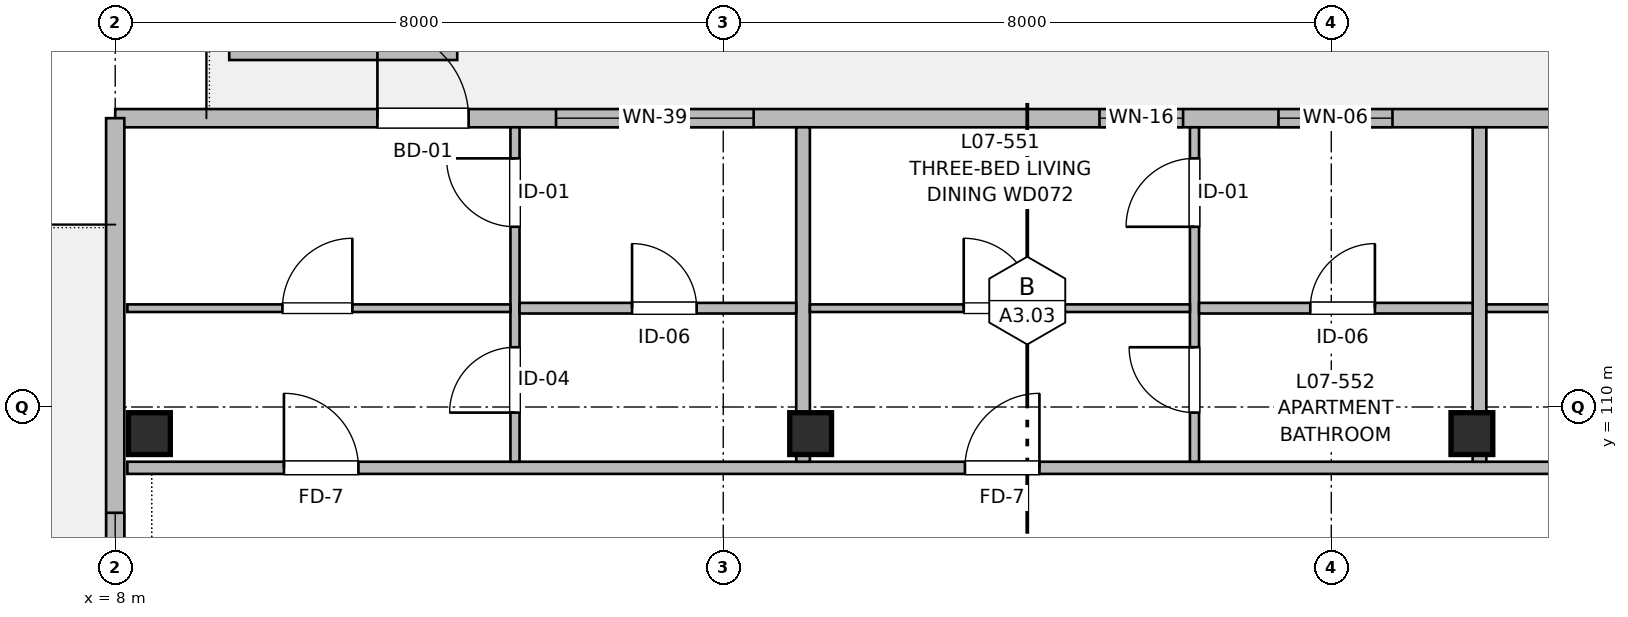
"""IFC4 building model, lengths in metres.
Left out: names, types, materials, properties, quantities, classifications, styles, units other than length and angle.
Written with IfcOpenShell. Run it as: python <this file> out.ifc"""

import sys

from ifc_helpers import new_model, si_unit, direction, frame, frame_2d, origin, origin_2d, place, context, subcontext, project, spatial, rectangle, extrude, element, fill, save


model = new_model("IFC4")
c1 = context("Model", 3, precision=1e-05, world=origin(), true_north=direction((0.0, 1.0)))
c2 = subcontext(c1, "Body", "Model", "MODEL_VIEW")
j1 = project(units=[si_unit("LENGTHUNIT", "METRE"), si_unit("PLANEANGLEUNIT", "RADIAN")], contexts=[c1])
p1 = place(None, origin())
s1 = spatial("IfcSite", under=j1, at=p1, CompositionType="ELEMENT")
p2 = place(p1, origin())
s2 = spatial("IfcBuilding", under=s1, at=p2, CompositionType="ELEMENT")
p3 = place(p2, frame((0.0, 0.0, 23.36)))
s3 = spatial("IfcBuildingStorey", under=s2, at=p3, CompositionType="ELEMENT", Elevation=23.36)
for number, where, z_axis, x_axis in (
    (1, (8.45, 109.65, 0.0), (0.0, 0.0, 1.0), (1.0, 0.0, 0.0)),
    (2, (17.15, 109.65, 0.0), (0.0, 0.0, 1.0), (1.0, 0.0, 0.0)),
    (3, (25.85, 109.65, 0.0), (0.0, 0.0, 1.0), (1.0, 0.0, 0.0)),
):
    element("IfcColumn", number, at=place(p3, frame(where, z_axis=z_axis, x_axis=x_axis)), inside=s3, PredefinedType="COLUMN", context=c2, shape_type="SweptSolid", body=[
        extrude(rectangle(XDim=0.55, YDim=0.55, at=origin_2d()), origin(), (0.0, 0.0, 1.0), 3.2),
    ])
p4 = place(p3, frame((8.0, 113.8, 0.0), z_axis=(0.0, 0.0, 1.0), x_axis=(1.0, 0.0, 0.0)))
e4 = element("IfcWall", 4, at=p4, inside=s3, PredefinedType="SOLIDWALL", context=c2, shape_type="SweptSolid", body=[
    extrude(rectangle(XDim=27.0, YDim=0.24, at=frame_2d((13.5, 0.0))), origin(), (0.0, 0.0, 1.0), 2.98),
])
p5 = place(p4, frame((3.45, 0.0, 0.0)))
e5 = element("IfcOpeningElement", 5, at=p5, cuts=e4, PredefinedType="OPENING", context=c2, shape_type="SweptSolid", body=[
    extrude(rectangle(XDim=1.2, YDim=2.2, at=frame_2d((0.6, 1.1))), frame((0.0, 0.13, 0.0), z_axis=(0.0, -1.0, 0.0), x_axis=(1.0, 0.0, 0.0)), (0.0, 0.0, 1.0), 0.26),
])
p6 = place(p4, frame((5.8, 0.0, 0.67)))
e6 = element("IfcOpeningElement", 6, at=p6, cuts=e4, PredefinedType="OPENING", context=c2, shape_type="SweptSolid", body=[
    extrude(rectangle(XDim=2.6, YDim=1.55, at=frame_2d((1.3, 0.775))), frame((0.0, 0.13, 0.0), z_axis=(0.0, -1.0, 0.0), x_axis=(1.0, 0.0, 0.0)), (0.0, 0.0, 1.0), 0.26),
])
p7 = place(p4, frame((12.95, 0.0, 0.62)))
e7 = element("IfcOpeningElement", 7, at=p7, cuts=e4, PredefinedType="OPENING", context=c2, shape_type="SweptSolid", body=[
    extrude(rectangle(XDim=1.1, YDim=1.6, at=frame_2d((0.55, 0.8))), frame((0.0, 0.13, 0.0), z_axis=(0.0, -1.0, 0.0), x_axis=(1.0, 0.0, 0.0)), (0.0, 0.0, 1.0), 0.26),
])
p8 = place(p4, frame((21.45, 0.0, 0.0)))
e8 = element("IfcOpeningElement", 8, at=p8, cuts=e4, PredefinedType="OPENING", context=c2, shape_type="SweptSolid", body=[
    extrude(rectangle(XDim=1.2, YDim=2.2, at=frame_2d((0.6, 1.1))), frame((0.0, 0.13, 0.0), z_axis=(0.0, -1.0, 0.0), x_axis=(1.0, 0.0, 0.0)), (0.0, 0.0, 1.0), 0.26),
])
p9 = place(p4, frame((23.8, 0.0, 0.72)))
e9 = element("IfcOpeningElement", 9, at=p9, cuts=e4, PredefinedType="OPENING", context=c2, shape_type="SweptSolid", body=[
    extrude(rectangle(XDim=1.8, YDim=1.5, at=frame_2d((0.9, 0.75))), frame((0.0, 0.13, 0.0), z_axis=(0.0, -1.0, 0.0), x_axis=(1.0, 0.0, 0.0)), (0.0, 0.0, 1.0), 0.26),
])
p10 = place(p4, frame((15.305, 0.0, 0.82)))
e10 = element("IfcOpeningElement", 10, at=p10, cuts=e4, PredefinedType="OPENING", context=c2, shape_type="SweptSolid", body=[
    extrude(rectangle(XDim=1.5, YDim=1.4, at=frame_2d((0.75, 0.7))), frame((0.0, 0.13, 0.0), z_axis=(0.0, -1.0, 0.0), x_axis=(1.0, 0.0, 0.0)), (0.0, 0.0, 1.0), 0.26),
])
p11 = place(p3, frame((8.0, 64.4, 0.0), z_axis=(0.0, 0.0, 1.0), x_axis=(0.0, 1.0, 0.0)))
e11 = element("IfcWall", 11, at=p11, inside=s3, PredefinedType="SOLIDWALL", context=c2, shape_type="SweptSolid", body=[
    extrude(rectangle(XDim=49.4, YDim=0.24, at=frame_2d((24.7, 0.0))), origin(), (0.0, 0.0, 1.0), 2.98),
])
p12 = place(p11, frame((3.792, 0.0, 0.9)))
e12 = element("IfcOpeningElement", 12, at=p12, cuts=e11, PredefinedType="OPENING", context=c2, shape_type="SweptSolid", body=[
    extrude(rectangle(XDim=0.65, YDim=0.95, at=frame_2d((0.325, 0.475))), frame((0.0, 0.13, 0.0), z_axis=(0.0, -1.0, 0.0), x_axis=(1.0, 0.0, 0.0)), (0.0, 0.0, 1.0), 0.26),
])
p13 = place(p11, frame((11.8, 0.0, 0.62)))
e13 = element("IfcOpeningElement", 13, at=p13, cuts=e11, PredefinedType="OPENING", context=c2, shape_type="SweptSolid", body=[
    extrude(rectangle(XDim=1.1, YDim=1.6, at=frame_2d((0.55, 0.8))), frame((0.0, 0.13, 0.0), z_axis=(0.0, -1.0, 0.0), x_axis=(1.0, 0.0, 0.0)), (0.0, 0.0, 1.0), 0.26),
])
p14 = place(p11, frame((18.683, 0.0, 0.0)))
e14 = element("IfcOpeningElement", 14, at=p14, cuts=e11, PredefinedType="OPENING", context=c2, shape_type="SweptSolid", body=[
    extrude(rectangle(XDim=1.2, YDim=2.2, at=frame_2d((0.6, 1.1))), frame((0.0, 0.13, 0.0), z_axis=(0.0, -1.0, 0.0), x_axis=(1.0, 0.0, 0.0)), (0.0, 0.0, 1.0), 0.26),
])
p15 = place(p11, frame((21.883, 0.0, 0.72)))
e15 = element("IfcOpeningElement", 15, at=p15, cuts=e11, PredefinedType="OPENING", context=c2, shape_type="SweptSolid", body=[
    extrude(rectangle(XDim=1.8, YDim=1.5, at=frame_2d((0.9, 0.75))), frame((0.0, 0.13, 0.0), z_axis=(0.0, -1.0, 0.0), x_axis=(1.0, 0.0, 0.0)), (0.0, 0.0, 1.0), 0.26),
])
p16 = place(p11, frame((29.267, 0.0, 0.72)))
e16 = element("IfcOpeningElement", 16, at=p16, cuts=e11, PredefinedType="OPENING", context=c2, shape_type="SweptSolid", body=[
    extrude(rectangle(XDim=1.7, YDim=1.5, at=frame_2d((0.85, 0.75))), frame((0.0, 0.13, 0.0), z_axis=(0.0, -1.0, 0.0), x_axis=(1.0, 0.0, 0.0)), (0.0, 0.0, 1.0), 0.26),
])
p17 = place(p11, frame((32.9, 0.0, 0.57)))
e17 = element("IfcOpeningElement", 17, at=p17, cuts=e11, PredefinedType="OPENING", context=c2, shape_type="SweptSolid", body=[
    extrude(rectangle(XDim=2.3, YDim=1.65, at=frame_2d((1.15, 0.825))), frame((0.0, 0.13, 0.0), z_axis=(0.0, -1.0, 0.0), x_axis=(1.0, 0.0, 0.0)), (0.0, 0.0, 1.0), 0.26),
])
p18 = place(p11, frame((42.758, 0.0, 0.77)))
e18 = element("IfcOpeningElement", 18, at=p18, cuts=e11, PredefinedType="OPENING", context=c2, shape_type="SweptSolid", body=[
    extrude(rectangle(XDim=1.45, YDim=1.45, at=frame_2d((0.725, 0.725))), frame((0.0, 0.13, 0.0), z_axis=(0.0, -1.0, 0.0), x_axis=(1.0, 0.0, 0.0)), (0.0, 0.0, 1.0), 0.26),
])
p19 = place(p3, frame((9.5, 114.65, 0.0), z_axis=(0.0, 0.0, 1.0), x_axis=(1.0, 0.0, 0.0)))
e19 = element("IfcWall", 19, at=p19, inside=s3, PredefinedType="PARAPET", context=c2, shape_type="SweptSolid", body=[
    extrude(rectangle(XDim=3.0, YDim=0.17, at=frame_2d((1.5, 0.0))), origin(), (0.0, 0.0, 1.0), 0.45),
])
p20 = place(p3, frame((8.16, 109.2, 0.0), z_axis=(0.0, 0.0, 1.0), x_axis=(1.0, 0.0, 0.0)))
e20 = element("IfcWall", 20, at=p20, inside=s3, PredefinedType="PARTITIONING", context=c2, shape_type="SweptSolid", body=[
    extrude(rectangle(XDim=26.68, YDim=0.16, at=frame_2d((13.34, 0.0))), origin(), (0.0, 0.0, 1.0), 2.935),
])
p21 = place(p20, frame((2.06, 0.0, 0.0)))
e21 = element("IfcOpeningElement", 21, at=p21, cuts=e20, PredefinedType="OPENING", context=c2, shape_type="SweptSolid", body=[
    extrude(rectangle(XDim=0.98, YDim=2.15, at=frame_2d((0.49, 1.075))), frame((0.0, 0.09, 0.0), z_axis=(0.0, -1.0, 0.0), x_axis=(1.0, 0.0, 0.0)), (0.0, 0.0, 1.0), 0.18),
])
p22 = place(p20, frame((11.02, 0.0, 0.0)))
e22 = element("IfcOpeningElement", 22, at=p22, cuts=e20, PredefinedType="OPENING", context=c2, shape_type="SweptSolid", body=[
    extrude(rectangle(XDim=0.98, YDim=2.15, at=frame_2d((0.49, 1.075))), frame((0.0, 0.09, 0.0), z_axis=(0.0, -1.0, 0.0), x_axis=(1.0, 0.0, 0.0)), (0.0, 0.0, 1.0), 0.18),
])
p23 = place(p20, frame((19.94, 0.0, 0.0)))
e23 = element("IfcOpeningElement", 23, at=p23, cuts=e20, PredefinedType="OPENING", context=c2, shape_type="SweptSolid", body=[
    extrude(rectangle(XDim=0.98, YDim=2.15, at=frame_2d((0.49, 1.075))), frame((0.0, 0.09, 0.0), z_axis=(0.0, -1.0, 0.0), x_axis=(1.0, 0.0, 0.0)), (0.0, 0.0, 1.0), 0.18),
])
for number, where, z_axis, x_axis in (
    (24, (17.05, 109.28, 0.0), (0.0, 0.0, 1.0), (0.0, 1.0, 0.0)),
    (25, (25.95, 109.28, 0.0), (0.0, 0.0, 1.0), (0.0, 1.0, 0.0)),
):
    element("IfcWall", number, at=place(p3, frame(where, z_axis=z_axis, x_axis=x_axis)), inside=s3, PredefinedType="PARTITIONING", context=c2, shape_type="SweptSolid", body=[
        extrude(rectangle(XDim=4.4, YDim=0.18, at=frame_2d((2.2, 0.0))), origin(), (0.0, 0.0, 1.0), 2.935),
    ])
p24 = place(p3, frame((13.26, 109.28, 0.0), z_axis=(0.0, 0.0, 1.0), x_axis=(0.0, 1.0, 0.0)))
e26 = element("IfcWall", 26, at=p24, inside=s3, PredefinedType="PARTITIONING", context=c2, shape_type="SweptSolid", body=[
    extrude(rectangle(XDim=4.4, YDim=0.12, at=frame_2d((2.2, 0.0))), origin(), (0.0, 0.0, 1.0), 2.935),
])
p25 = place(p24, frame((0.646, 0.0, 0.0)))
e27 = element("IfcOpeningElement", 27, at=p25, cuts=e26, PredefinedType="OPENING", context=c2, shape_type="SweptSolid", body=[
    extrude(rectangle(XDim=0.86, YDim=2.1, at=frame_2d((0.43, 1.05))), frame((0.0, 0.07, 0.0), z_axis=(0.0, -1.0, 0.0), x_axis=(1.0, 0.0, 0.0)), (0.0, 0.0, 1.0), 0.14),
])
p26 = place(p24, frame((3.091, 0.0, 0.0)))
e28 = element("IfcOpeningElement", 28, at=p26, cuts=e26, PredefinedType="OPENING", context=c2, shape_type="SweptSolid", body=[
    extrude(rectangle(XDim=0.9, YDim=2.1, at=frame_2d((0.45, 1.05))), frame((0.0, 0.07, 0.0), z_axis=(0.0, -1.0, 0.0), x_axis=(1.0, 0.0, 0.0)), (0.0, 0.0, 1.0), 0.14),
])
p27 = place(p3, frame((13.32, 111.3, 0.0), z_axis=(0.0, 0.0, 1.0), x_axis=(1.0, 0.0, 0.0)))
e29 = element("IfcWall", 29, at=p27, inside=s3, PredefinedType="PARTITIONING", context=c2, shape_type="SweptSolid", body=[
    extrude(rectangle(XDim=3.64, YDim=0.14, at=frame_2d((1.82, 0.0))), origin(), (0.0, 0.0, 1.0), 2.935),
])
p28 = place(p27, frame((1.48, 0.0, 0.0)))
e30 = element("IfcOpeningElement", 30, at=p28, cuts=e29, PredefinedType="OPENING", context=c2, shape_type="SweptSolid", body=[
    extrude(rectangle(XDim=0.85, YDim=2.05, at=frame_2d((0.425, 1.025))), frame((0.0, 0.08, 0.0), z_axis=(0.0, -1.0, 0.0), x_axis=(1.0, 0.0, 0.0)), (0.0, 0.0, 1.0), 0.16),
])
p29 = place(p3, frame((8.16, 111.3, 0.0), z_axis=(0.0, 0.0, 1.0), x_axis=(1.0, 0.0, 0.0)))
e31 = element("IfcWall", 31, at=p29, inside=s3, PredefinedType="PARTITIONING", context=c2, shape_type="SweptSolid", body=[
    extrude(rectangle(XDim=5.04, YDim=0.1, at=frame_2d((2.52, 0.0))), origin(), (0.0, 0.0, 1.0), 2.935),
])
p30 = place(p29, frame((2.04, 0.0, 0.0)))
e32 = element("IfcOpeningElement", 32, at=p30, cuts=e31, PredefinedType="OPENING", context=c2, shape_type="SweptSolid", body=[
    extrude(rectangle(XDim=0.92, YDim=2.1, at=frame_2d((0.46, 1.05))), frame((0.0, 0.06, 0.0), z_axis=(0.0, -1.0, 0.0), x_axis=(1.0, 0.0, 0.0)), (0.0, 0.0, 1.0), 0.12),
])
p31 = place(p3, frame((22.2, 109.28, 0.0), z_axis=(0.0, 0.0, 1.0), x_axis=(0.0, 1.0, 0.0)))
e33 = element("IfcWall", 33, at=p31, inside=s3, PredefinedType="PARTITIONING", context=c2, shape_type="SweptSolid", body=[
    extrude(rectangle(XDim=4.4, YDim=0.12, at=frame_2d((2.2, 0.0))), origin(), (0.0, 0.0, 1.0), 2.935),
])
p32 = place(p31, frame((0.646, 0.0, 0.0)))
e34 = element("IfcOpeningElement", 34, at=p32, cuts=e33, PredefinedType="OPENING", context=c2, shape_type="SweptSolid", body=[
    extrude(rectangle(XDim=0.86, YDim=2.1, at=frame_2d((0.43, 1.05))), frame((0.0, 0.07, 0.0), z_axis=(0.0, -1.0, 0.0), x_axis=(1.0, 0.0, 0.0)), (0.0, 0.0, 1.0), 0.14),
])
p33 = place(p31, frame((3.091, 0.0, 0.0)))
e35 = element("IfcOpeningElement", 35, at=p33, cuts=e33, PredefinedType="OPENING", context=c2, shape_type="SweptSolid", body=[
    extrude(rectangle(XDim=0.9, YDim=2.1, at=frame_2d((0.45, 1.05))), frame((0.0, 0.07, 0.0), z_axis=(0.0, -1.0, 0.0), x_axis=(1.0, 0.0, 0.0)), (0.0, 0.0, 1.0), 0.14),
])
p34 = place(p3, frame((22.26, 111.3, 0.0), z_axis=(0.0, 0.0, 1.0), x_axis=(1.0, 0.0, 0.0)))
e36 = element("IfcWall", 36, at=p34, inside=s3, PredefinedType="PARTITIONING", context=c2, shape_type="SweptSolid", body=[
    extrude(rectangle(XDim=3.6, YDim=0.14, at=frame_2d((1.8, 0.0))), origin(), (0.0, 0.0, 1.0), 2.935),
])
p35 = place(p34, frame((1.464, 0.0, 0.0)))
e37 = element("IfcOpeningElement", 37, at=p35, cuts=e36, PredefinedType="OPENING", context=c2, shape_type="SweptSolid", body=[
    extrude(rectangle(XDim=0.85, YDim=2.05, at=frame_2d((0.425, 1.025))), frame((0.0, 0.08, 0.0), z_axis=(0.0, -1.0, 0.0), x_axis=(1.0, 0.0, 0.0)), (0.0, 0.0, 1.0), 0.16),
])
p36 = place(p3, frame((17.14, 111.3, 0.0), z_axis=(0.0, 0.0, 1.0), x_axis=(1.0, 0.0, 0.0)))
e38 = element("IfcWall", 38, at=p36, inside=s3, PredefinedType="PARTITIONING", context=c2, shape_type="SweptSolid", body=[
    extrude(rectangle(XDim=5.0, YDim=0.1, at=frame_2d((2.5, 0.0))), origin(), (0.0, 0.0, 1.0), 2.935),
])
p37 = place(p36, frame((2.024, 0.0, 0.0)))
e39 = element("IfcOpeningElement", 39, at=p37, cuts=e38, PredefinedType="OPENING", context=c2, shape_type="SweptSolid", body=[
    extrude(rectangle(XDim=0.92, YDim=2.1, at=frame_2d((0.46, 1.05))), frame((0.0, 0.06, 0.0), z_axis=(0.0, -1.0, 0.0), x_axis=(1.0, 0.0, 0.0)), (0.0, 0.0, 1.0), 0.12),
])
p38 = place(p3, frame((26.04, 111.3, 0.0), z_axis=(0.0, 0.0, 1.0), x_axis=(1.0, 0.0, 0.0)))
e40 = element("IfcWall", 40, at=p38, inside=s3, PredefinedType="PARTITIONING", context=c2, shape_type="SweptSolid", body=[
    extrude(rectangle(XDim=5.04, YDim=0.1, at=frame_2d((2.52, 0.0))), origin(), (0.0, 0.0, 1.0), 2.935),
])
p39 = place(p38, frame((2.04, 0.0, 0.0)))
e41 = element("IfcOpeningElement", 41, at=p39, cuts=e40, PredefinedType="OPENING", context=c2, shape_type="SweptSolid", body=[
    extrude(rectangle(XDim=0.92, YDim=2.1, at=frame_2d((0.46, 1.05))), frame((0.0, 0.06, 0.0), z_axis=(0.0, -1.0, 0.0), x_axis=(1.0, 0.0, 0.0)), (0.0, 0.0, 1.0), 0.12),
])
p40 = place(p5, origin())
e42 = element("IfcDoor", 42, at=p40, inside=s3, OperationType="SINGLE_SWING_LEFT", PredefinedType="DOOR", context=c2, shape_type="SweptSolid", body=[
    extrude(rectangle(XDim=1.2, YDim=2.2, at=frame_2d((0.6, 1.1))), frame((0.0, 0.025, 0.0), z_axis=(0.0, -1.0, 0.0), x_axis=(1.0, 0.0, 0.0)), (0.0, 0.0, 1.0), 0.05),
])
fill(e5, e42)
p41 = place(p6, origin())
e43 = element("IfcWindow", 43, at=p41, inside=s3, PartitioningType="SINGLE_PANEL", PredefinedType="WINDOW", context=c2, shape_type="SweptSolid", body=[
    extrude(rectangle(XDim=2.6, YDim=1.55, at=frame_2d((1.3, 0.775))), frame((0.0, 0.03, 0.0), z_axis=(0.0, -1.0, 0.0), x_axis=(1.0, 0.0, 0.0)), (0.0, 0.0, 1.0), 0.06),
])
fill(e6, e43)
p42 = place(p7, origin())
e44 = element("IfcWindow", 44, at=p42, inside=s3, PartitioningType="SINGLE_PANEL", PredefinedType="WINDOW", context=c2, shape_type="SweptSolid", body=[
    extrude(rectangle(XDim=1.1, YDim=1.6, at=frame_2d((0.55, 0.8))), frame((0.0, 0.03, 0.0), z_axis=(0.0, -1.0, 0.0), x_axis=(1.0, 0.0, 0.0)), (0.0, 0.0, 1.0), 0.06),
])
fill(e7, e44)
p43 = place(p18, origin())
e45 = element("IfcWindow", 45, at=p43, inside=s3, PartitioningType="SINGLE_PANEL", PredefinedType="WINDOW", context=c2, shape_type="SweptSolid", body=[
    extrude(rectangle(XDim=1.45, YDim=1.45, at=frame_2d((0.725, 0.725))), frame((0.0, 0.03, 0.0), z_axis=(0.0, -1.0, 0.0), x_axis=(1.0, 0.0, 0.0)), (0.0, 0.0, 1.0), 0.06),
])
fill(e18, e45)
p44 = place(p21, origin())
e46 = element("IfcDoor", 46, at=p44, inside=s3, OperationType="SINGLE_SWING_LEFT", PredefinedType="DOOR", context=c2, shape_type="SweptSolid", body=[
    extrude(rectangle(XDim=0.98, YDim=2.15, at=frame_2d((0.49, 1.075))), frame((0.0, 0.025, 0.0), z_axis=(0.0, -1.0, 0.0), x_axis=(1.0, 0.0, 0.0)), (0.0, 0.0, 1.0), 0.05),
])
fill(e21, e46)
p45 = place(p30, origin())
e47 = element("IfcDoor", 47, at=p45, inside=s3, OperationType="SINGLE_SWING_RIGHT", PredefinedType="DOOR", context=c2, shape_type="SweptSolid", body=[
    extrude(rectangle(XDim=0.92, YDim=2.1, at=frame_2d((0.46, 1.05))), frame((0.0, 0.025, 0.0), z_axis=(0.0, -1.0, 0.0), x_axis=(1.0, 0.0, 0.0)), (0.0, 0.0, 1.0), 0.05),
])
fill(e32, e47)
p46 = place(p25, origin())
e48 = element("IfcDoor", 48, at=p46, inside=s3, OperationType="SINGLE_SWING_LEFT", PredefinedType="DOOR", context=c2, shape_type="SweptSolid", body=[
    extrude(rectangle(XDim=0.86, YDim=2.1, at=frame_2d((0.43, 1.05))), frame((0.0, 0.025, 0.0), z_axis=(0.0, -1.0, 0.0), x_axis=(1.0, 0.0, 0.0)), (0.0, 0.0, 1.0), 0.05),
])
fill(e27, e48)
p47 = place(p26, origin())
e49 = element("IfcDoor", 49, at=p47, inside=s3, OperationType="SINGLE_SWING_RIGHT", PredefinedType="DOOR", context=c2, shape_type="SweptSolid", body=[
    extrude(rectangle(XDim=0.9, YDim=2.1, at=frame_2d((0.45, 1.05))), frame((0.0, 0.025, 0.0), z_axis=(0.0, -1.0, 0.0), x_axis=(1.0, 0.0, 0.0)), (0.0, 0.0, 1.0), 0.05),
])
fill(e28, e49)
p48 = place(p28, origin())
e50 = element("IfcDoor", 50, at=p48, inside=s3, OperationType="SINGLE_SWING_LEFT", PredefinedType="DOOR", context=c2, shape_type="SweptSolid", body=[
    extrude(rectangle(XDim=0.85, YDim=2.05, at=frame_2d((0.425, 1.025))), frame((0.0, 0.025, 0.0), z_axis=(0.0, -1.0, 0.0), x_axis=(1.0, 0.0, 0.0)), (0.0, 0.0, 1.0), 0.05),
])
fill(e30, e50)
p49 = place(p22, origin())
e51 = element("IfcDoor", 51, at=p49, inside=s3, OperationType="SINGLE_SWING_RIGHT", PredefinedType="DOOR", context=c2, shape_type="SweptSolid", body=[
    extrude(rectangle(XDim=0.98, YDim=2.15, at=frame_2d((0.49, 1.075))), frame((0.0, 0.025, 0.0), z_axis=(0.0, -1.0, 0.0), x_axis=(1.0, 0.0, 0.0)), (0.0, 0.0, 1.0), 0.05),
])
fill(e22, e51)
p50 = place(p37, origin())
e52 = element("IfcDoor", 52, at=p50, inside=s3, OperationType="SINGLE_SWING_LEFT", PredefinedType="DOOR", context=c2, shape_type="SweptSolid", body=[
    extrude(rectangle(XDim=0.92, YDim=2.1, at=frame_2d((0.46, 1.05))), frame((0.0, 0.025, 0.0), z_axis=(0.0, -1.0, 0.0), x_axis=(1.0, 0.0, 0.0)), (0.0, 0.0, 1.0), 0.05),
])
fill(e39, e52)
p51 = place(p32, origin())
e53 = element("IfcDoor", 53, at=p51, inside=s3, OperationType="SINGLE_SWING_RIGHT", PredefinedType="DOOR", context=c2, shape_type="SweptSolid", body=[
    extrude(rectangle(XDim=0.86, YDim=2.1, at=frame_2d((0.43, 1.05))), frame((0.0, 0.025, 0.0), z_axis=(0.0, -1.0, 0.0), x_axis=(1.0, 0.0, 0.0)), (0.0, 0.0, 1.0), 0.05),
])
fill(e34, e53)
p52 = place(p33, origin())
e54 = element("IfcDoor", 54, at=p52, inside=s3, OperationType="SINGLE_SWING_LEFT", PredefinedType="DOOR", context=c2, shape_type="SweptSolid", body=[
    extrude(rectangle(XDim=0.9, YDim=2.1, at=frame_2d((0.45, 1.05))), frame((0.0, 0.025, 0.0), z_axis=(0.0, -1.0, 0.0), x_axis=(1.0, 0.0, 0.0)), (0.0, 0.0, 1.0), 0.05),
])
fill(e35, e54)
p53 = place(p35, origin())
e55 = element("IfcDoor", 55, at=p53, inside=s3, OperationType="SINGLE_SWING_RIGHT", PredefinedType="DOOR", context=c2, shape_type="SweptSolid", body=[
    extrude(rectangle(XDim=0.85, YDim=2.05, at=frame_2d((0.425, 1.025))), frame((0.0, 0.025, 0.0), z_axis=(0.0, -1.0, 0.0), x_axis=(1.0, 0.0, 0.0)), (0.0, 0.0, 1.0), 0.05),
])
fill(e37, e55)
p54 = place(p10, origin())
e56 = element("IfcWindow", 56, at=p54, inside=s3, PartitioningType="SINGLE_PANEL", PredefinedType="WINDOW", context=c2, shape_type="SweptSolid", body=[
    extrude(rectangle(XDim=1.5, YDim=1.4, at=frame_2d((0.75, 0.7))), frame((0.0, 0.03, 0.0), z_axis=(0.0, -1.0, 0.0), x_axis=(1.0, 0.0, 0.0)), (0.0, 0.0, 1.0), 0.06),
])
fill(e10, e56)
save(model, sys.argv[1])
